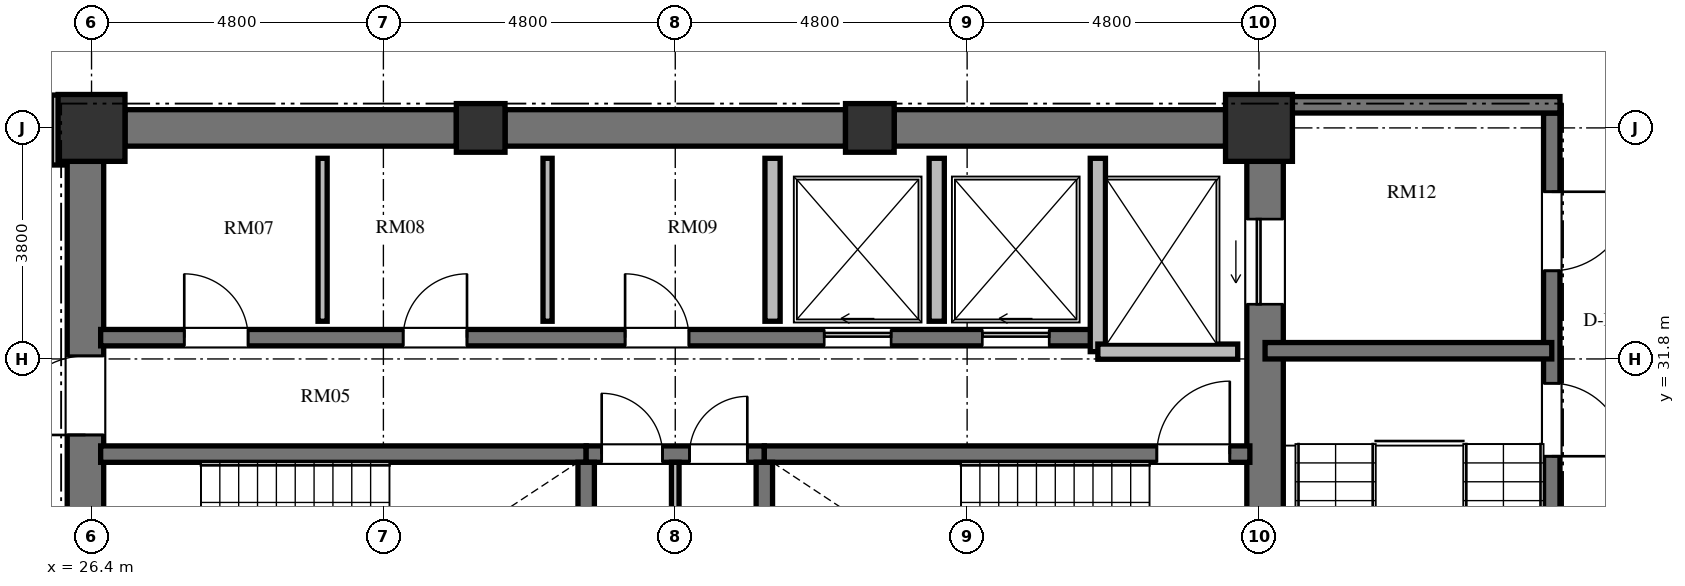
"""IFC4 building model, lengths in metres.
Left out: names, types, materials, properties, quantities, classifications, styles, units other than length and angle.
Written with IfcOpenShell. Run it as: python <this file> out.ifc"""

import sys

from ifc_helpers import new_model, si_unit, direction, frame, frame_2d, origin, origin_2d, place, context, subcontext, project, spatial, rectangle, extrude, element, fill, save


model = new_model("IFC4")
c1 = context("Model", 3, precision=1e-05, world=origin(), true_north=direction((0.0, 1.0)))
c2 = subcontext(c1, "Body", "Model", "MODEL_VIEW")
j1 = project(units=[si_unit("LENGTHUNIT", "METRE"), si_unit("PLANEANGLEUNIT", "RADIAN")], contexts=[c1])
p1 = place(None, origin())
s1 = spatial("IfcSite", under=j1, at=p1, CompositionType="ELEMENT")
p2 = place(p1, origin())
s2 = spatial("IfcBuilding", under=s1, at=p2, CompositionType="ELEMENT")
p3 = place(p2, frame((0.0, 0.0, 213.072)))
s3 = spatial("IfcBuildingStorey", under=s2, at=p3, CompositionType="ELEMENT", Elevation=213.072)
p4 = place(p3, frame((45.6, 35.6, 0.0), z_axis=(0.0, 0.0, 1.0), x_axis=(1.0, 0.0, 0.0)))
e1 = element("IfcColumn", 1, at=p4, inside=s3, PredefinedType="COLUMN", context=c2, shape_type="SweptSolid", body=[
    extrude(rectangle(XDim=1.1, YDim=1.1, at=origin_2d()), origin(), (0.0, 0.0, 1.0), 3.648),
])
for number, where, z_axis, x_axis in (
    (2, (39.2, 35.6, 0.0), (0.0, 0.0, 1.0), (1.0, 0.0, 0.0)),
    (3, (32.8, 35.6, 0.0), (0.0, 0.0, 1.0), (1.0, 0.0, 0.0)),
):
    element("IfcColumn", number, at=place(p3, frame(where, z_axis=z_axis, x_axis=x_axis)), inside=s3, PredefinedType="COLUMN", context=c2, shape_type="SweptSolid", body=[
        extrude(rectangle(XDim=0.8, YDim=0.8, at=origin_2d()), origin(), (0.0, 0.0, 1.0), 3.648),
    ])
p5 = place(p3, frame((26.4, 35.6, 0.0), z_axis=(0.0, 0.0, 1.0), x_axis=(1.0, 0.0, 0.0)))
e4 = element("IfcColumn", 4, at=p5, inside=s3, PredefinedType="COLUMN", context=c2, shape_type="SweptSolid", body=[
    extrude(rectangle(XDim=1.1, YDim=1.1, at=origin_2d()), origin(), (0.0, 0.0, 1.0), 3.648),
])
p6 = place(p3, frame((26.3, 20.95, 0.0), z_axis=(0.0, 0.0, 1.0), x_axis=(0.0, 1.0, 0.0)))
e5 = element("IfcWall", 5, at=p6, inside=s3, PredefinedType="SHEAR", context=c2, shape_type="SweptSolid", body=[
    extrude(rectangle(XDim=14.1, YDim=0.6, at=frame_2d((7.05, 0.0))), origin(), (0.0, 0.0, 1.0), 3.648),
])
p7 = place(p6, frame((6.5, 0.0, 0.0)))
e6 = element("IfcOpeningElement", 6, at=p7, cuts=e5, PredefinedType="OPENING", context=c2, shape_type="SweptSolid", body=[
    extrude(rectangle(XDim=1.2, YDim=2.15, at=frame_2d((0.6, 1.075))), frame((0.0, 0.31, 0.0), z_axis=(0.0, -1.0, 0.0), x_axis=(1.0, 0.0, 0.0)), (0.0, 0.0, 1.0), 0.62),
])
p8 = place(p6, frame((9.6, 0.0, 0.0)))
e7 = element("IfcOpeningElement", 7, at=p8, cuts=e5, PredefinedType="OPENING", context=c2, shape_type="SweptSolid", body=[
    extrude(rectangle(XDim=1.3, YDim=2.2, at=frame_2d((0.65, 1.1))), frame((0.0, 0.31, 0.0), z_axis=(0.0, -1.0, 0.0), x_axis=(1.0, 0.0, 0.0)), (0.0, 0.0, 1.0), 0.62),
])
p9 = place(p6, frame((3.26, 0.0, 0.0)))
e8 = element("IfcOpeningElement", 8, at=p9, cuts=e5, PredefinedType="OPENING", context=c2, shape_type="SweptSolid", body=[
    extrude(rectangle(XDim=1.3, YDim=2.2, at=frame_2d((0.65, 1.1))), frame((0.0, 0.31, 0.0), z_axis=(0.0, -1.0, 0.0), x_axis=(1.0, 0.0, 0.0)), (0.0, 0.0, 1.0), 0.62),
])
p10 = place(p3, frame((45.7, 20.95, 0.0), z_axis=(0.0, 0.0, 1.0), x_axis=(0.0, 1.0, 0.0)))
e9 = element("IfcWall", 9, at=p10, inside=s3, PredefinedType="SHEAR", context=c2, shape_type="SweptSolid", body=[
    extrude(rectangle(XDim=14.1, YDim=0.6, at=frame_2d((7.05, 0.0))), origin(), (0.0, 0.0, 1.0), 3.648),
])
p11 = place(p10, frame((11.75, 0.0, 0.0)))
e10 = element("IfcOpeningElement", 10, at=p11, cuts=e9, PredefinedType="OPENING", context=c2, shape_type="SweptSolid", body=[
    extrude(rectangle(XDim=1.4, YDim=2.3, at=frame_2d((0.7, 1.15))), frame((0.0, 0.31, 0.0), z_axis=(0.0, -1.0, 0.0), x_axis=(1.0, 0.0, 0.0)), (0.0, 0.0, 1.0), 0.62),
])
p12 = place(p10, frame((0.95, 0.0, 0.0)))
e11 = element("IfcOpeningElement", 11, at=p12, cuts=e9, PredefinedType="OPENING", context=c2, shape_type="SweptSolid", body=[
    extrude(rectangle(XDim=1.4, YDim=2.3, at=frame_2d((0.7, 1.15))), frame((0.0, 0.31, 0.0), z_axis=(0.0, -1.0, 0.0), x_axis=(1.0, 0.0, 0.0)), (0.0, 0.0, 1.0), 0.62),
])
p13 = place(p3, frame((26.95, 35.6, 0.0), z_axis=(0.0, 0.0, 1.0), x_axis=(1.0, 0.0, 0.0)))
e12 = element("IfcWall", 12, at=p13, inside=s3, PredefinedType="SHEAR", context=c2, shape_type="SweptSolid", body=[
    extrude(rectangle(XDim=5.45, YDim=0.6, at=frame_2d((2.725, 0.0))), origin(), (0.0, 0.0, 1.0), 3.648),
])
p14 = place(p3, frame((33.2, 35.6, 0.0), z_axis=(0.0, 0.0, 1.0), x_axis=(1.0, 0.0, 0.0)))
e13 = element("IfcWall", 13, at=p14, inside=s3, PredefinedType="SHEAR", context=c2, shape_type="SweptSolid", body=[
    extrude(rectangle(XDim=5.6, YDim=0.6, at=frame_2d((2.8, 0.0))), origin(), (0.0, 0.0, 1.0), 3.648),
])
p15 = place(p3, frame((39.6, 35.6, 0.0), z_axis=(0.0, 0.0, 1.0), x_axis=(1.0, 0.0, 0.0)))
e14 = element("IfcWall", 14, at=p15, inside=s3, PredefinedType="SHEAR", context=c2, shape_type="SweptSolid", body=[
    extrude(rectangle(XDim=5.45, YDim=0.6, at=frame_2d((2.725, 0.0))), origin(), (0.0, 0.0, 1.0), 3.648),
])
p16 = place(p3, frame((26.55, 30.235, 0.0), z_axis=(0.0, 0.0, 1.0), x_axis=(1.0, 0.0, 0.0)))
e15 = element("IfcWall", 15, at=p16, inside=s3, PredefinedType="SHEAR", context=c2, shape_type="SweptSolid", body=[
    extrude(rectangle(XDim=7.985, YDim=0.27, at=frame_2d((3.992, 0.0))), origin(), (0.0, 0.0, 1.0), 3.648),
])
p17 = place(p3, frame((34.535, 30.235, 0.0), z_axis=(0.0, 0.0, 1.0), x_axis=(1.0, 0.0, 0.0)))
e16 = element("IfcWall", 16, at=p17, inside=s3, PredefinedType="SHEAR", context=c2, shape_type="SweptSolid", body=[
    extrude(rectangle(XDim=2.93, YDim=0.27, at=frame_2d((1.465, 0.0))), origin(), (0.0, 0.0, 1.0), 3.648),
])
p18 = place(p17, frame((0.255, 0.0, 0.0)))
e17 = element("IfcOpeningElement", 17, at=p18, cuts=e16, PredefinedType="OPENING", context=c2, shape_type="SweptSolid", body=[
    extrude(rectangle(XDim=1.0, YDim=2.1, at=frame_2d((0.5, 1.05))), frame((0.0, 0.145, 0.0), z_axis=(0.0, -1.0, 0.0), x_axis=(1.0, 0.0, 0.0)), (0.0, 0.0, 1.0), 0.29),
])
p19 = place(p17, frame((1.7, 0.0, 0.0)))
e18 = element("IfcOpeningElement", 18, at=p19, cuts=e16, PredefinedType="OPENING", context=c2, shape_type="SweptSolid", body=[
    extrude(rectangle(XDim=0.95, YDim=2.1, at=frame_2d((0.475, 1.05))), frame((0.0, 0.145, 0.0), z_axis=(0.0, -1.0, 0.0), x_axis=(1.0, 0.0, 0.0)), (0.0, 0.0, 1.0), 0.29),
])
p20 = place(p3, frame((37.465, 30.235, 0.0), z_axis=(0.0, 0.0, 1.0), x_axis=(1.0, 0.0, 0.0)))
e19 = element("IfcWall", 19, at=p20, inside=s3, PredefinedType="SHEAR", context=c2, shape_type="SweptSolid", body=[
    extrude(rectangle(XDim=7.985, YDim=0.27, at=frame_2d((3.992, 0.0))), origin(), (0.0, 0.0, 1.0), 3.648),
])
p21 = place(p20, frame((6.455, 0.0, 0.0)))
e20 = element("IfcOpeningElement", 20, at=p21, cuts=e19, PredefinedType="OPENING", context=c2, shape_type="SweptSolid", body=[
    extrude(rectangle(XDim=1.2, YDim=2.15, at=frame_2d((0.6, 1.075))), frame((0.0, 0.145, 0.0), z_axis=(0.0, -1.0, 0.0), x_axis=(1.0, 0.0, 0.0)), (0.0, 0.0, 1.0), 0.29),
])
for number, where, z_axis, x_axis in (
    (21, (34.535, 26.02, 0.0), (0.0, 0.0, 1.0), (0.0, 1.0, 0.0)),
    (22, (37.465, 26.02, 0.0), (0.0, 0.0, 1.0), (0.0, 1.0, 0.0)),
):
    element("IfcWall", number, at=place(p3, frame(where, z_axis=z_axis, x_axis=x_axis)), inside=s3, PredefinedType="SHEAR", context=c2, shape_type="SweptSolid", body=[
        extrude(rectangle(XDim=4.08, YDim=0.27, at=frame_2d((2.04, 0.0))), origin(), (0.0, 0.0, 1.0), 3.648),
    ])
p22 = place(p3, frame((36.0, 26.02, 0.0), z_axis=(0.0, 0.0, 1.0), x_axis=(0.0, 1.0, 0.0)))
e23 = element("IfcWall", 23, at=p22, inside=s3, PredefinedType="PARTITIONING", context=c2, shape_type="SweptSolid", body=[
    extrude(rectangle(XDim=4.08, YDim=0.125, at=frame_2d((2.04, 0.0))), origin(), (0.0, 0.0, 1.0), 3.448),
])
p23 = place(p3, frame((26.55, 32.15, 0.0), z_axis=(0.0, 0.0, 1.0), x_axis=(1.0, 0.0, 0.0)))
e24 = element("IfcWall", 24, at=p23, inside=s3, PredefinedType="SHEAR", context=c2, shape_type="SweptSolid", body=[
    extrude(rectangle(XDim=16.4, YDim=0.27, at=frame_2d((8.2, 0.0))), origin(), (0.0, 0.0, 1.0), 3.648),
])
p24 = place(p23, frame((1.375, 0.0, 0.0)))
e25 = element("IfcOpeningElement", 25, at=p24, cuts=e24, PredefinedType="OPENING", context=c2, shape_type="SweptSolid", body=[
    extrude(rectangle(XDim=1.05, YDim=2.15, at=frame_2d((0.525, 1.075))), frame((0.0, 0.145, 0.0), z_axis=(0.0, -1.0, 0.0), x_axis=(1.0, 0.0, 0.0)), (0.0, 0.0, 1.0), 0.29),
])
p25 = place(p23, frame((4.975, 0.0, 0.0)))
e26 = element("IfcOpeningElement", 26, at=p25, cuts=e24, PredefinedType="OPENING", context=c2, shape_type="SweptSolid", body=[
    extrude(rectangle(XDim=1.05, YDim=2.15, at=frame_2d((0.525, 1.075))), frame((0.0, 0.145, 0.0), z_axis=(0.0, -1.0, 0.0), x_axis=(1.0, 0.0, 0.0)), (0.0, 0.0, 1.0), 0.29),
])
p26 = place(p23, frame((8.625, 0.0, 0.0)))
e27 = element("IfcOpeningElement", 27, at=p26, cuts=e24, PredefinedType="OPENING", context=c2, shape_type="SweptSolid", body=[
    extrude(rectangle(XDim=1.05, YDim=2.15, at=frame_2d((0.525, 1.075))), frame((0.0, 0.145, 0.0), z_axis=(0.0, -1.0, 0.0), x_axis=(1.0, 0.0, 0.0)), (0.0, 0.0, 1.0), 0.29),
])
p27 = place(p23, frame((11.9, 0.0, 0.0)))
e28 = element("IfcOpeningElement", 28, at=p27, cuts=e24, PredefinedType="OPENING", context=c2, shape_type="SweptSolid", body=[
    extrude(rectangle(XDim=1.1, YDim=2.2, at=frame_2d((0.55, 1.1))), frame((0.0, 0.145, 0.0), z_axis=(0.0, -1.0, 0.0), x_axis=(1.0, 0.0, 0.0)), (0.0, 0.0, 1.0), 0.29),
])
p28 = place(p23, frame((14.5, 0.0, 0.0)))
e29 = element("IfcOpeningElement", 29, at=p28, cuts=e24, PredefinedType="OPENING", context=c2, shape_type="SweptSolid", body=[
    extrude(rectangle(XDim=1.1, YDim=2.2, at=frame_2d((0.55, 1.1))), frame((0.0, 0.145, 0.0), z_axis=(0.0, -1.0, 0.0), x_axis=(1.0, 0.0, 0.0)), (0.0, 0.0, 1.0), 0.29),
])
p29 = place(p3, frame((42.95, 31.92, 0.0), z_axis=(0.0, 0.0, 1.0), x_axis=(0.0, 1.0, 0.0)))
e30 = element("IfcWall", 30, at=p29, inside=s3, PredefinedType="SOLIDWALL", context=c2, shape_type="SweptSolid", body=[
    extrude(rectangle(XDim=3.18, YDim=0.25, at=frame_2d((1.59, 0.0))), origin(), (0.0, 0.0, 1.0), 3.448),
])
p30 = place(p3, frame((42.95, 31.92, 0.0), z_axis=(0.0, 0.0, 1.0), x_axis=(1.0, 0.0, 0.0)))
e31 = element("IfcWall", 31, at=p30, inside=s3, PredefinedType="SOLIDWALL", context=c2, shape_type="SweptSolid", body=[
    extrude(rectangle(XDim=2.3, YDim=0.25, at=frame_2d((1.15, 0.0))), origin(), (0.0, 0.0, 1.0), 3.448),
])
for number, where, z_axis, x_axis in (
    (32, (37.6, 32.42, 0.0), (0.0, 0.0, 1.0), (0.0, 1.0, 0.0)),
    (33, (40.3, 32.42, 0.0), (0.0, 0.0, 1.0), (0.0, 1.0, 0.0)),
):
    element("IfcWall", number, at=place(p3, frame(where, z_axis=z_axis, x_axis=x_axis)), inside=s3, PredefinedType="SOLIDWALL", context=c2, shape_type="SweptSolid", body=[
        extrude(rectangle(XDim=2.68, YDim=0.25, at=frame_2d((1.34, 0.0))), origin(), (0.0, 0.0, 1.0), 3.448),
    ])
for number, where, z_axis, x_axis in (
    (34, (30.2, 32.42, 0.0), (0.0, 0.0, 1.0), (0.0, 1.0, 0.0)),
    (35, (33.9, 32.42, 0.0), (0.0, 0.0, 1.0), (0.0, 1.0, 0.0)),
):
    element("IfcWall", number, at=place(p3, frame(where, z_axis=z_axis, x_axis=x_axis)), inside=s3, PredefinedType="PARTITIONING", context=c2, shape_type="SweptSolid", body=[
        extrude(rectangle(XDim=2.68, YDim=0.15, at=frame_2d((1.34, 0.0))), origin(), (0.0, 0.0, 1.0), 3.448),
    ])
p31 = place(p3, frame((50.415, 35.845, 0.0), z_axis=(0.0, 0.0, 1.0), x_axis=(0.0, -1.0, 0.0)))
e36 = element("IfcWall", 36, at=p31, inside=s3, PredefinedType="SHEAR", context=c2, shape_type="SweptSolid", body=[
    extrude(rectangle(XDim=15.825, YDim=0.27, at=frame_2d((7.913, 0.0))), origin(), (0.0, 0.0, 1.0), 3.648),
])
p32 = place(p31, frame((4.445, 0.0, 0.0)))
e37 = element("IfcOpeningElement", 37, at=p32, cuts=e36, PredefinedType="OPENING", context=c2, shape_type="SweptSolid", body=[
    extrude(rectangle(XDim=1.2, YDim=2.15, at=frame_2d((0.6, 1.075))), frame((0.0, 0.145, 0.0), z_axis=(0.0, -1.0, 0.0), x_axis=(1.0, 0.0, 0.0)), (0.0, 0.0, 1.0), 0.29),
])
p33 = place(p31, frame((1.295, 0.0, 0.0)))
e38 = element("IfcOpeningElement", 38, at=p33, cuts=e36, PredefinedType="OPENING", context=c2, shape_type="SweptSolid", body=[
    extrude(rectangle(XDim=1.3, YDim=2.2, at=frame_2d((0.65, 1.1))), frame((0.0, 0.145, 0.0), z_axis=(0.0, -1.0, 0.0), x_axis=(1.0, 0.0, 0.0)), (0.0, 0.0, 1.0), 0.29),
])
p34 = place(p31, frame((13.095, 0.0, 0.0)))
e39 = element("IfcOpeningElement", 39, at=p34, cuts=e36, PredefinedType="OPENING", context=c2, shape_type="SweptSolid", body=[
    extrude(rectangle(XDim=1.3, YDim=2.2, at=frame_2d((0.65, 1.1))), frame((0.0, 0.145, 0.0), z_axis=(0.0, -1.0, 0.0), x_axis=(1.0, 0.0, 0.0)), (0.0, 0.0, 1.0), 0.29),
])
p35 = place(p3, frame((46.0, 35.98, 0.0), z_axis=(0.0, 0.0, 1.0), x_axis=(1.0, 0.0, 0.0)))
e40 = element("IfcWall", 40, at=p35, inside=s3, PredefinedType="SHEAR", context=c2, shape_type="SweptSolid", body=[
    extrude(rectangle(XDim=4.55, YDim=0.27, at=frame_2d((2.275, 0.0))), origin(), (0.0, 0.0, 1.0), 3.648),
])
p36 = place(p3, frame((45.7, 31.935, 0.0), z_axis=(0.0, 0.0, 1.0), x_axis=(1.0, 0.0, 0.0)))
e41 = element("IfcWall", 41, at=p36, inside=s3, PredefinedType="SHEAR", context=c2, shape_type="SweptSolid", body=[
    extrude(rectangle(XDim=4.715, YDim=0.27, at=frame_2d((2.357, 0.0))), origin(), (0.0, 0.0, 1.0), 3.648),
])
p37 = place(p3, frame((23.294, 36.422, 0.0), z_axis=(0.0, 0.0, 1.0), x_axis=(0.945493277461, 0.325641616316, 0.0)))
e42 = element("IfcWall", 42, at=p37, inside=s3, PredefinedType="PARTITIONING", context=c2, shape_type="SweptSolid", body=[
    extrude(rectangle(XDim=5.562, YDim=0.18, at=frame_2d((2.781, 0.0))), origin(), (0.0, 0.0, 1.0), 3.073),
])
p38 = place(p37, frame((3.256, 0.0, 0.0)))
e43 = element("IfcOpeningElement", 43, at=p38, cuts=e42, PredefinedType="OPENING", context=c2, shape_type="SweptSolid", body=[
    extrude(rectangle(XDim=1.05, YDim=2.15, at=frame_2d((0.525, 1.075))), frame((0.0, 0.1, 0.0), z_axis=(0.0, -1.0, 0.0), x_axis=(1.0, 0.0, 0.0)), (0.0, 0.0, 1.0), 0.2),
])
p39 = place(p3, frame((25.83, 36.14, 0.0), z_axis=(0.0, 0.0, 1.0), x_axis=(0.0, -1.0, 0.0)))
e44 = element("IfcWall", 44, at=p39, inside=s3, PredefinedType="PARTITIONING", context=c2, shape_type="SweptSolid", body=[
    extrude(rectangle(XDim=1.15, YDim=0.18, at=frame_2d((0.575, 0.0))), origin(), (0.0, 0.0, 1.0), 3.448),
])
p40 = place(p21, origin())
e45 = element("IfcDoor", 45, at=p40, inside=s3, OperationType="SINGLE_SWING_RIGHT", PredefinedType="DOOR", context=c2, shape_type="SweptSolid", body=[
    extrude(rectangle(XDim=1.2, YDim=2.15, at=frame_2d((0.6, 1.075))), frame((0.0, 0.025, 0.0), z_axis=(0.0, -1.0, 0.0), x_axis=(1.0, 0.0, 0.0)), (0.0, 0.0, 1.0), 0.05),
])
fill(e20, e45)
p41 = place(p18, origin())
e46 = element("IfcDoor", 46, at=p41, inside=s3, OperationType="SINGLE_SWING_LEFT", PredefinedType="DOOR", context=c2, shape_type="SweptSolid", body=[
    extrude(rectangle(XDim=1.0, YDim=2.1, at=frame_2d((0.5, 1.05))), frame((0.0, 0.025, 0.0), z_axis=(0.0, -1.0, 0.0), x_axis=(1.0, 0.0, 0.0)), (0.0, 0.0, 1.0), 0.05),
])
fill(e17, e46)
p42 = place(p19, origin())
e47 = element("IfcDoor", 47, at=p42, inside=s3, OperationType="SINGLE_SWING_RIGHT", PredefinedType="DOOR", context=c2, shape_type="SweptSolid", body=[
    extrude(rectangle(XDim=0.95, YDim=2.1, at=frame_2d((0.475, 1.05))), frame((0.0, 0.025, 0.0), z_axis=(0.0, -1.0, 0.0), x_axis=(1.0, 0.0, 0.0)), (0.0, 0.0, 1.0), 0.05),
])
fill(e18, e47)
p43 = place(p8, origin())
e48 = element("IfcDoor", 48, at=p43, inside=s3, OperationType="SINGLE_SWING_LEFT", PredefinedType="DOOR", context=c2, shape_type="SweptSolid", body=[
    extrude(rectangle(XDim=1.3, YDim=2.2, at=frame_2d((0.65, 1.1))), frame((0.0, 0.025, 0.0), z_axis=(0.0, -1.0, 0.0), x_axis=(1.0, 0.0, 0.0)), (0.0, 0.0, 1.0), 0.05),
])
fill(e7, e48)
p44 = place(p24, origin())
e49 = element("IfcDoor", 49, at=p44, inside=s3, OperationType="SINGLE_SWING_LEFT", PredefinedType="DOOR", context=c2, shape_type="SweptSolid", body=[
    extrude(rectangle(XDim=1.05, YDim=2.15, at=frame_2d((0.525, 1.075))), frame((0.0, 0.025, 0.0), z_axis=(0.0, -1.0, 0.0), x_axis=(1.0, 0.0, 0.0)), (0.0, 0.0, 1.0), 0.05),
])
fill(e25, e49)
p45 = place(p25, origin())
e50 = element("IfcDoor", 50, at=p45, inside=s3, OperationType="SINGLE_SWING_RIGHT", PredefinedType="DOOR", context=c2, shape_type="SweptSolid", body=[
    extrude(rectangle(XDim=1.05, YDim=2.15, at=frame_2d((0.525, 1.075))), frame((0.0, 0.025, 0.0), z_axis=(0.0, -1.0, 0.0), x_axis=(1.0, 0.0, 0.0)), (0.0, 0.0, 1.0), 0.05),
])
fill(e26, e50)
p46 = place(p26, origin())
e51 = element("IfcDoor", 51, at=p46, inside=s3, OperationType="SINGLE_SWING_LEFT", PredefinedType="DOOR", context=c2, shape_type="SweptSolid", body=[
    extrude(rectangle(XDim=1.05, YDim=2.15, at=frame_2d((0.525, 1.075))), frame((0.0, 0.025, 0.0), z_axis=(0.0, -1.0, 0.0), x_axis=(1.0, 0.0, 0.0)), (0.0, 0.0, 1.0), 0.05),
])
fill(e27, e51)
p47 = place(p27, origin())
e52 = element("IfcDoor", 52, at=p47, inside=s3, OperationType="SLIDING_TO_LEFT", PredefinedType="DOOR", context=c2, shape_type="SweptSolid", body=[
    extrude(rectangle(XDim=1.1, YDim=2.2, at=frame_2d((0.55, 1.1))), frame((0.0, 0.025, 0.0), z_axis=(0.0, -1.0, 0.0), x_axis=(1.0, 0.0, 0.0)), (0.0, 0.0, 1.0), 0.05),
])
fill(e28, e52)
p48 = place(p28, origin())
e53 = element("IfcDoor", 53, at=p48, inside=s3, OperationType="SLIDING_TO_LEFT", PredefinedType="DOOR", context=c2, shape_type="SweptSolid", body=[
    extrude(rectangle(XDim=1.1, YDim=2.2, at=frame_2d((0.55, 1.1))), frame((0.0, 0.025, 0.0), z_axis=(0.0, -1.0, 0.0), x_axis=(1.0, 0.0, 0.0)), (0.0, 0.0, 1.0), 0.05),
])
fill(e29, e53)
p49 = place(p11, origin())
e54 = element("IfcDoor", 54, at=p49, inside=s3, OperationType="SLIDING_TO_LEFT", PredefinedType="DOOR", context=c2, shape_type="SweptSolid", body=[
    extrude(rectangle(XDim=1.4, YDim=2.3, at=frame_2d((0.7, 1.15))), frame((0.0, 0.025, 0.0), z_axis=(0.0, -1.0, 0.0), x_axis=(1.0, 0.0, 0.0)), (0.0, 0.0, 1.0), 0.05),
])
fill(e10, e54)
p50 = place(p32, origin())
e55 = element("IfcDoor", 55, at=p50, inside=s3, OperationType="SINGLE_SWING_RIGHT", PredefinedType="DOOR", context=c2, shape_type="SweptSolid", body=[
    extrude(rectangle(XDim=1.2, YDim=2.15, at=frame_2d((0.6, 1.075))), frame((0.0, 0.025, 0.0), z_axis=(0.0, -1.0, 0.0), x_axis=(1.0, 0.0, 0.0)), (0.0, 0.0, 1.0), 0.05),
])
fill(e37, e55)
p51 = place(p33, origin())
e56 = element("IfcDoor", 56, at=p51, inside=s3, OperationType="SINGLE_SWING_LEFT", PredefinedType="DOOR", context=c2, shape_type="SweptSolid", body=[
    extrude(rectangle(XDim=1.3, YDim=2.2, at=frame_2d((0.65, 1.1))), frame((0.0, 0.025, 0.0), z_axis=(0.0, -1.0, 0.0), x_axis=(1.0, 0.0, 0.0)), (0.0, 0.0, 1.0), 0.05),
])
fill(e38, e56)
save(model, sys.argv[1])
